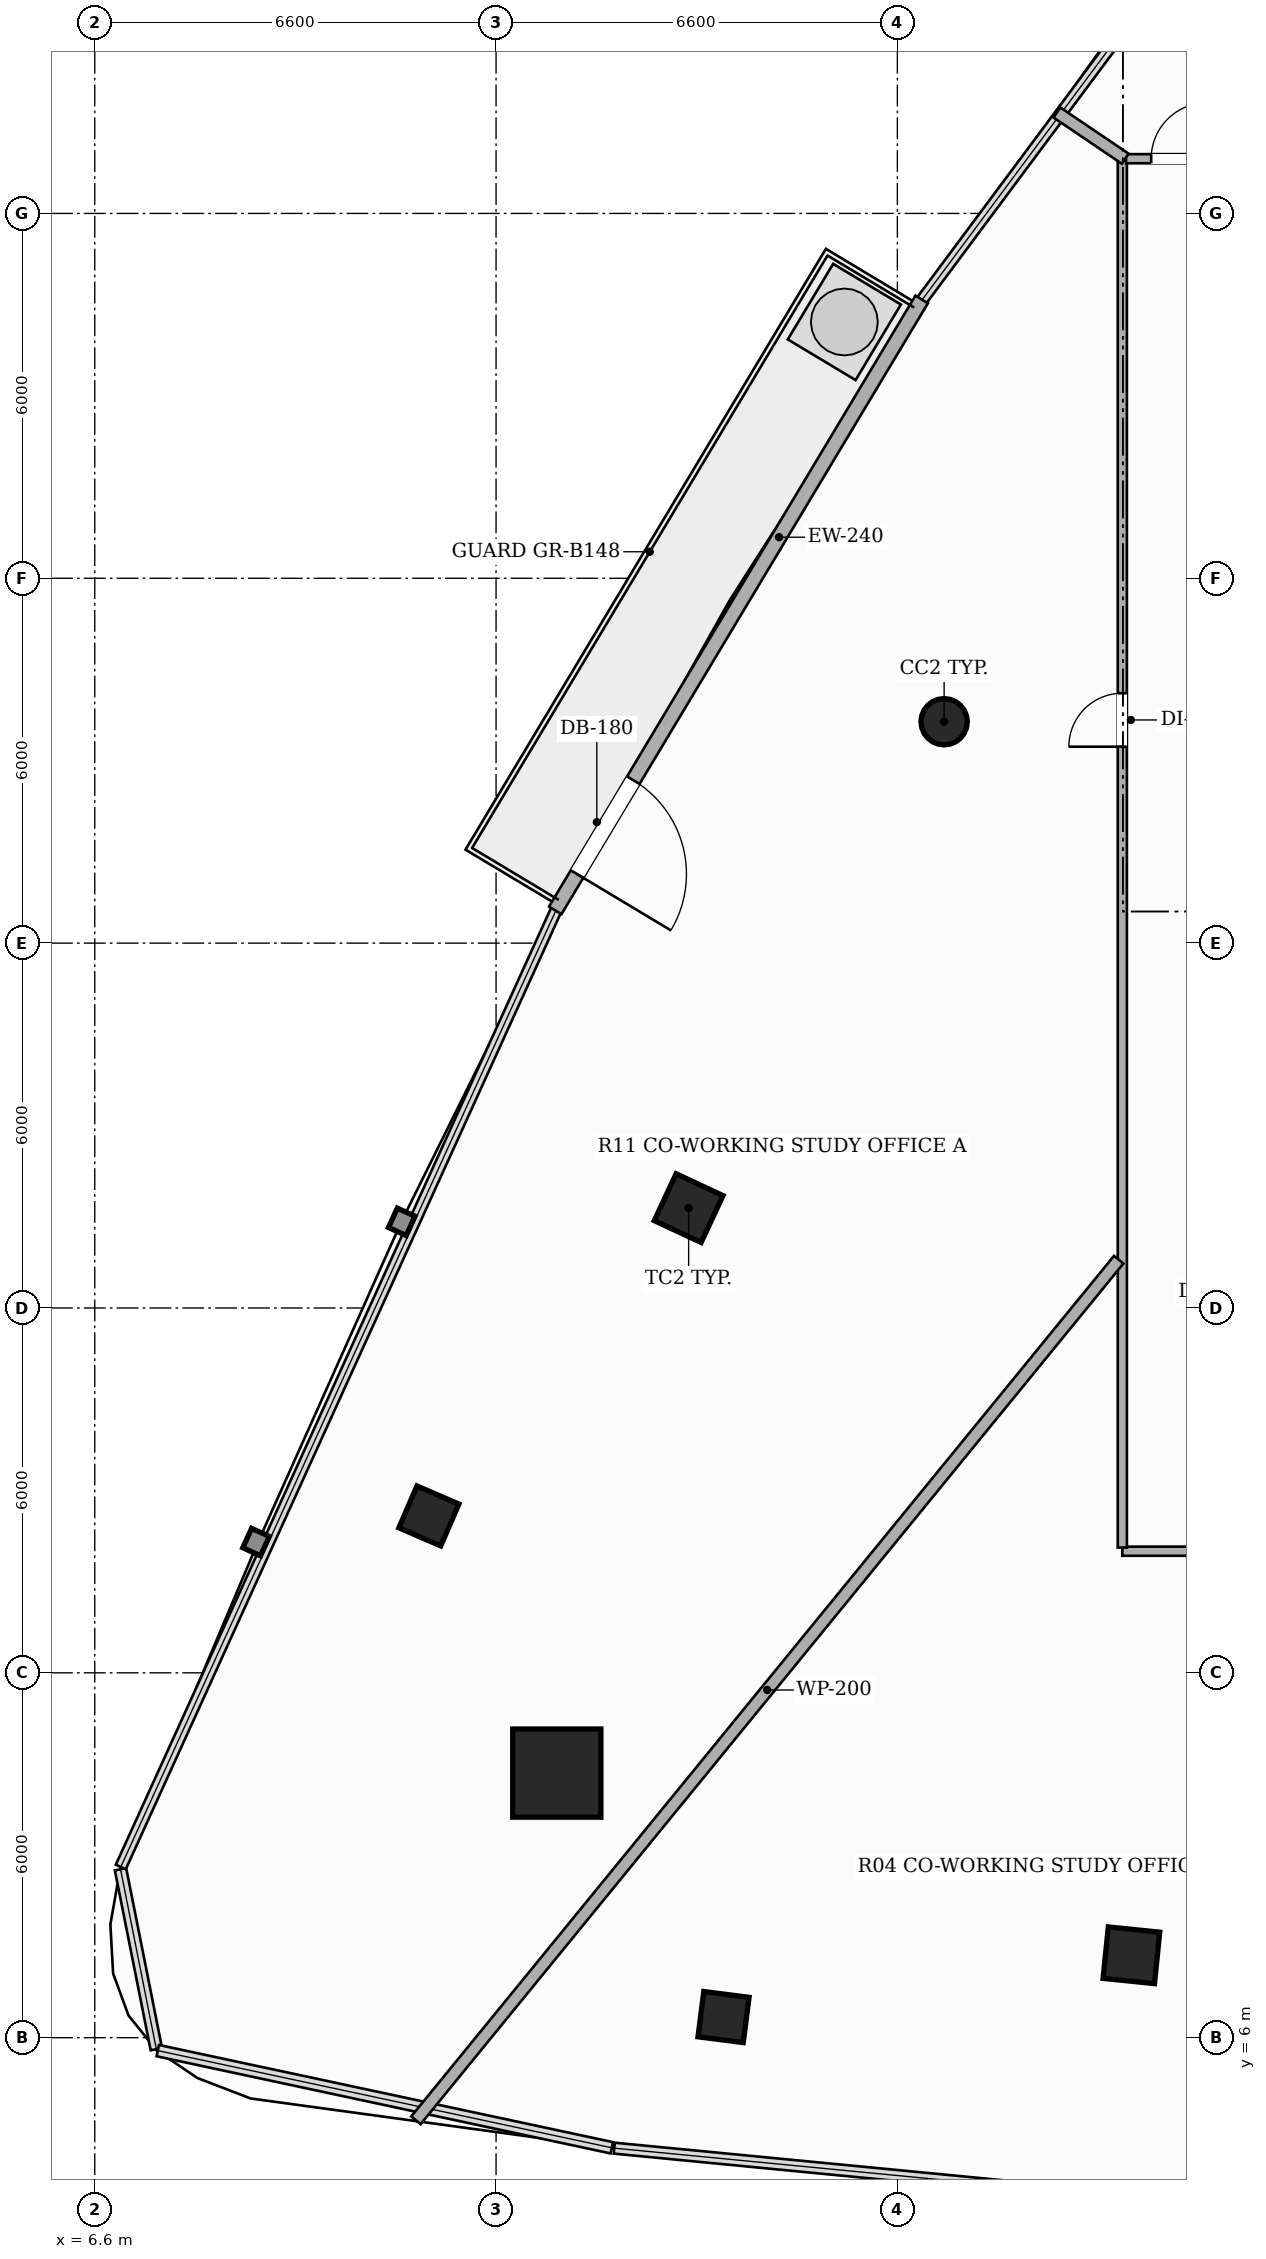
"""IFC4 building model, lengths in metres.
Left out: names, types, materials, properties, quantities, classifications, styles, units other than length and angle.
Written with IfcOpenShell. Run it as: python <this file> out.ifc"""

import sys

from ifc_helpers import new_model, si_unit, direction, frame, frame_2d, origin, origin_2d, place, context, subcontext, project, spatial, rectangle, hollow_rectangle, hollow_circle, extrude, element, fill, save


model = new_model("IFC4")
c1 = context("Model", 3, precision=1e-05, world=origin(), true_north=direction((0.0, 1.0)))
c2 = subcontext(c1, "Body", "Model", "MODEL_VIEW")
j1 = project(units=[si_unit("LENGTHUNIT", "METRE"), si_unit("PLANEANGLEUNIT", "RADIAN")], contexts=[c1])
p1 = place(None, origin())
s1 = spatial("IfcSite", under=j1, at=p1, CompositionType="ELEMENT")
p2 = place(p1, origin())
s2 = spatial("IfcBuilding", under=s1, at=p2, CompositionType="ELEMENT")
p3 = place(p2, frame((0.0, 0.0, 123.2)))
s3 = spatial("IfcBuildingStorey", under=s2, at=p3, CompositionType="ELEMENT", Elevation=123.2)
p4 = place(p3, frame((14.199, 10.351, 0.0), z_axis=(0.0, 0.0, 1.0), x_axis=(1.0, 0.0, 0.0)))
e1 = element("IfcColumn", 1, at=p4, inside=s3, PredefinedType="COLUMN", context=c2, shape_type="SweptSolid", body=[
    extrude(hollow_rectangle(XDim=1.45, YDim=1.45, WallThickness=0.045, at=origin_2d()), origin(), (0.0, 0.0, 1.0), 3.3),
])
p5 = place(p3, frame((20.569, 27.641, 0.0), z_axis=(0.0, 0.0, 1.0), x_axis=(1.0, 0.0, 0.0)))
e2 = element("IfcColumn", 2, at=p5, inside=s3, PredefinedType="COLUMN", context=c2, shape_type="SweptSolid", body=[
    extrude(hollow_circle(Radius=0.381, WallThickness=0.022, at=origin_2d()), origin(), (0.0, 0.0, 1.0), 3.3),
])
for number, where, z_axis, x_axis in (
    (3, (16.367, 19.642, 0.0), (0.0, 0.0, 1.0), (0.423, 0.906, 0.0)),
    (4, (23.649, 7.355, 0.0), (0.0, 0.0, 1.0), (-0.995, 0.101, 0.0)),
):
    element("IfcColumn", number, at=place(p3, frame(where, z_axis=z_axis, x_axis=x_axis)), inside=s3, PredefinedType="COLUMN", context=c2, shape_type="SweptSolid", body=[
        extrude(hollow_rectangle(XDim=0.85, YDim=0.85, WallThickness=0.028, at=origin_2d()), origin(), (0.0, 0.0, 1.0), 3.3),
    ])
for number, where, z_axis, x_axis in (
    (5, (12.095, 14.58, 0.0), (0.0, 0.0, 1.0), (0.397, 0.918, 0.0)),
    (6, (16.941, 6.339, 0.0), (0.0, 0.0, 1.0), (-0.992, 0.127, 0.0)),
):
    element("IfcColumn", number, at=place(p3, frame(where, z_axis=z_axis, x_axis=x_axis)), inside=s3, PredefinedType="COLUMN", context=c2, shape_type="SweptSolid", body=[
        extrude(hollow_rectangle(XDim=0.75, YDim=0.75, WallThickness=0.025, at=origin_2d()), origin(), (0.0, 0.0, 1.0), 3.3),
    ])
p6 = place(p3, frame((20.2, 34.586, 0.0), z_axis=(0.0, 0.0, 1.0), x_axis=(-0.514379309275, -0.857562782652, 0.0)))
e7 = element("IfcWall", 7, at=p6, inside=s3, PredefinedType="SOLIDWALL", context=c2, shape_type="SweptSolid", body=[
    extrude(rectangle(XDim=11.717, YDim=0.24, at=frame_2d((5.858, 0.0))), origin(), (0.0, 0.0, 1.0), 2.624),
])
p7 = place(p6, frame((9.22, 0.0, 0.0)))
e8 = element("IfcOpeningElement", 8, at=p7, cuts=e7, PredefinedType="OPENING", context=c2, shape_type="SweptSolid", body=[
    extrude(rectangle(XDim=1.8, YDim=2.2, at=frame_2d((0.9, 1.1))), frame((0.0, 0.13, 0.0), z_axis=(0.0, -1.0, 0.0), x_axis=(1.0, 0.0, 0.0)), (0.0, 0.0, 1.0), 0.26),
])
p8 = place(p3, frame((26.09, 14.0, 0.0), z_axis=(0.0, 0.0, 1.0), x_axis=(-1.0, 0.0, 0.0)))
e9 = element("IfcWall", 9, at=p8, inside=s3, PredefinedType="PARTITIONING", context=c2, shape_type="SweptSolid", body=[
    extrude(rectangle(XDim=2.59, YDim=0.15, at=frame_2d((1.295, 0.0))), origin(), (0.0, 0.0, 1.0), 2.721),
])
p9 = place(p3, frame((23.5, 14.06, 0.0), z_axis=(0.0, 0.0, 1.0), x_axis=(0.0, 1.0, 0.0)))
e10 = element("IfcWall", 10, at=p9, inside=s3, PredefinedType="PARTITIONING", context=c2, shape_type="SweptSolid", body=[
    extrude(rectangle(XDim=22.84, YDim=0.15, at=frame_2d((11.42, 0.0))), origin(), (0.0, 0.0, 1.0), 2.413),
])
p10 = place(p9, frame((13.17, 0.0, 0.0)))
e11 = element("IfcOpeningElement", 11, at=p10, cuts=e10, PredefinedType="OPENING", context=c2, shape_type="SweptSolid", body=[
    extrude(rectangle(XDim=0.88, YDim=2.1, at=frame_2d((0.44, 1.05))), frame((0.0, 0.085, 0.0), z_axis=(0.0, -1.0, 0.0), x_axis=(1.0, 0.0, 0.0)), (0.0, 0.0, 1.0), 0.17),
])
p11 = place(p3, frame((23.56, 36.9, 0.0), z_axis=(0.0, 0.0, 1.0), x_axis=(1.0, 0.0, 0.0)))
e12 = element("IfcWall", 12, at=p11, inside=s3, PredefinedType="PARTITIONING", context=c2, shape_type="SweptSolid", body=[
    extrude(rectangle(XDim=2.59, YDim=0.15, at=frame_2d((1.295, 0.0))), origin(), (0.0, 0.0, 1.0), 2.413),
])
p12 = place(p11, frame((0.414, 0.0, 0.0)))
e13 = element("IfcOpeningElement", 13, at=p12, cuts=e12, PredefinedType="OPENING", context=c2, shape_type="SweptSolid", body=[
    extrude(rectangle(XDim=0.92, YDim=2.15, at=frame_2d((0.46, 1.075))), frame((0.0, 0.085, 0.0), z_axis=(0.0, -1.0, 0.0), x_axis=(1.0, 0.0, 0.0)), (0.0, 0.0, 1.0), 0.17),
])
p13 = place(p3, frame((23.44, 18.794, 0.0), z_axis=(0.0, 0.0, 1.0), x_axis=(-0.632525219644, -0.774539764321, 0.0)))
e14 = element("IfcWall", 14, at=p13, inside=s3, PredefinedType="PARTITIONING", context=c2, shape_type="SweptSolid", body=[
    extrude(rectangle(XDim=18.272, YDim=0.2, at=frame_2d((9.136, 0.0))), origin(), (0.0, 0.0, 1.0), 2.413),
])
p14 = place(p3, frame((22.424, 37.66, 0.0), z_axis=(0.0, 0.0, 1.0), x_axis=(0.82818018374, -0.560461937388, 0.0)))
e15 = element("IfcWall", 15, at=p14, inside=s3, PredefinedType="PARTITIONING", context=c2, shape_type="SweptSolid", body=[
    extrude(rectangle(XDim=1.356, YDim=0.2, at=frame_2d((0.678, 0.0))), origin(), (0.0, 0.0, 1.0), 3.06),
])
p15 = place(p7, origin())
e16 = element("IfcDoor", 16, at=p15, inside=s3, OperationType="SINGLE_SWING_RIGHT", PredefinedType="DOOR", context=c2, shape_type="SweptSolid", body=[
    extrude(rectangle(XDim=1.8, YDim=2.2, at=frame_2d((0.9, 1.1))), frame((0.0, 0.025, 0.0), z_axis=(0.0, -1.0, 0.0), x_axis=(1.0, 0.0, 0.0)), (0.0, 0.0, 1.0), 0.05),
])
fill(e8, e16)
p16 = place(p10, origin())
e17 = element("IfcDoor", 17, at=p16, inside=s3, OperationType="SINGLE_SWING_LEFT", PredefinedType="DOOR", context=c2, shape_type="SweptSolid", body=[
    extrude(rectangle(XDim=0.88, YDim=2.1, at=frame_2d((0.44, 1.05))), frame((0.0, 0.025, 0.0), z_axis=(0.0, -1.0, 0.0), x_axis=(1.0, 0.0, 0.0)), (0.0, 0.0, 1.0), 0.05),
])
fill(e11, e17)
p17 = place(p12, origin())
e18 = element("IfcDoor", 18, at=p17, inside=s3, OperationType="SINGLE_SWING_RIGHT", PredefinedType="DOOR", context=c2, shape_type="SweptSolid", body=[
    extrude(rectangle(XDim=0.92, YDim=2.15, at=frame_2d((0.46, 1.075))), frame((0.0, 0.025, 0.0), z_axis=(0.0, -1.0, 0.0), x_axis=(1.0, 0.0, 0.0)), (0.0, 0.0, 1.0), 0.05),
])
fill(e13, e18)
save(model, sys.argv[1])
